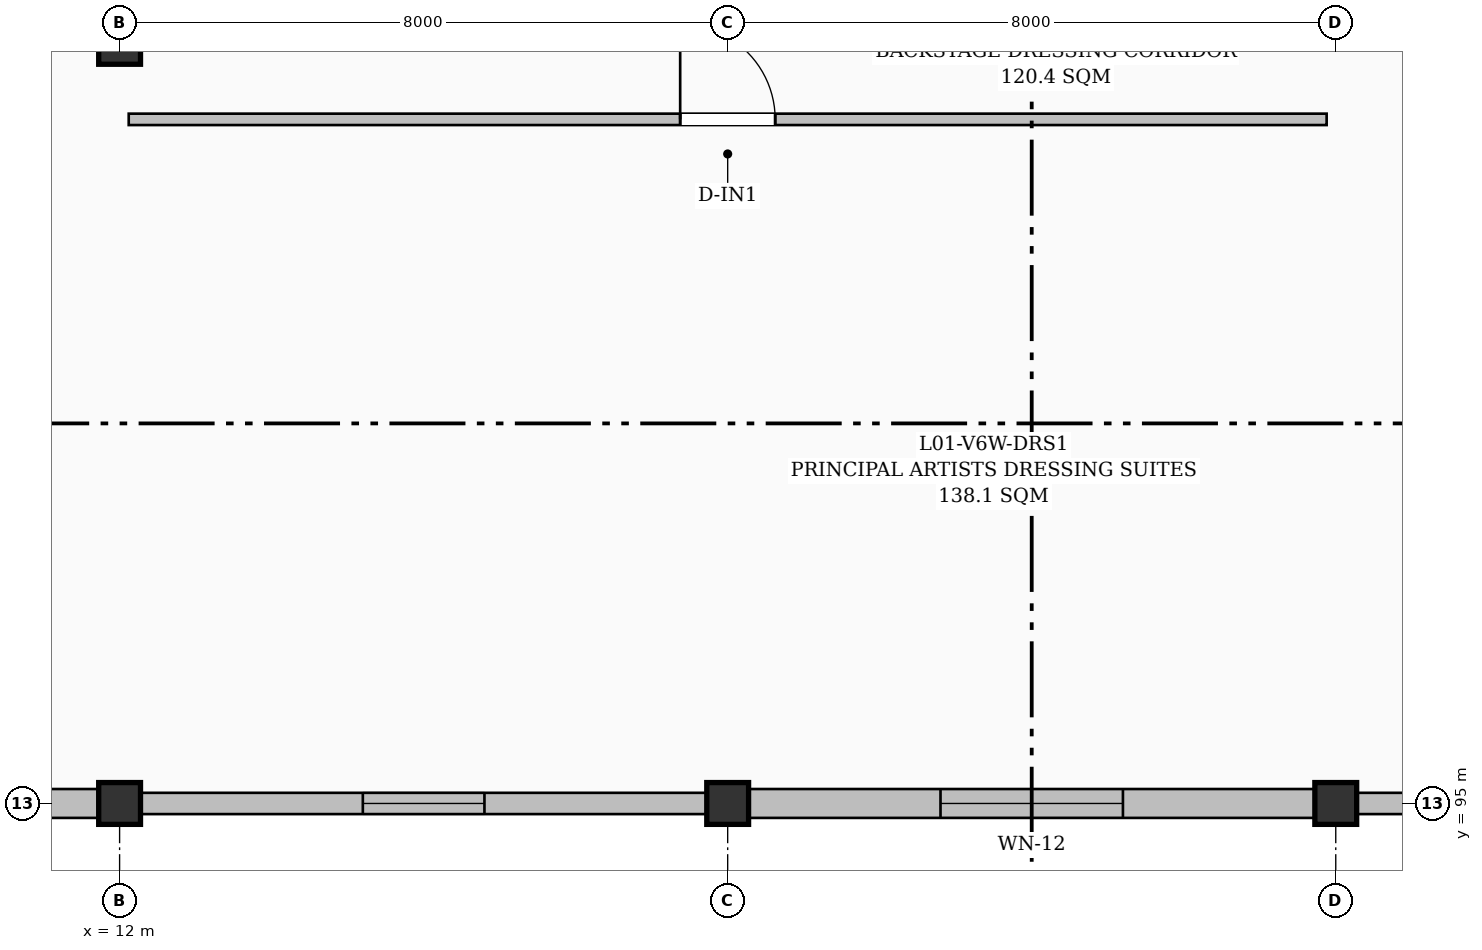
"""IFC4 building model, lengths in metres.
Left out: names, types, materials, properties, quantities, classifications, styles, units other than length and angle.
Written with IfcOpenShell. Run it as: python <this file> out.ifc"""

import sys

from ifc_helpers import new_model, si_unit, direction, frame, frame_2d, origin, origin_2d, place, context, subcontext, project, spatial, rectangle, extrude, element, fill, save


model = new_model("IFC4")
c1 = context("Model", 3, precision=1e-05, world=origin(), true_north=direction((0.0, 1.0)))
c2 = subcontext(c1, "Body", "Model", "MODEL_VIEW")
j1 = project(units=[si_unit("LENGTHUNIT", "METRE"), si_unit("PLANEANGLEUNIT", "RADIAN")], contexts=[c1])
p1 = place(None, origin())
s1 = spatial("IfcSite", under=j1, at=p1, CompositionType="ELEMENT")
p2 = place(p1, origin())
s2 = spatial("IfcBuilding", under=s1, at=p2, CompositionType="ELEMENT")
p3 = place(p2, frame((0.0, 0.0, 4.8)))
s3 = spatial("IfcBuildingStorey", under=s2, at=p3, CompositionType="ELEMENT", Elevation=4.8)
for number, where, z_axis, x_axis in (
    (1, (12.0, 95.0, 0.0), (0.0, 0.0, 1.0), (1.0, 0.0, 0.0)),
    (2, (12.0, 105.0, 0.0), (0.0, 0.0, 1.0), (1.0, 0.0, 0.0)),
    (3, (20.0, 95.0, 0.0), (0.0, 0.0, 1.0), (1.0, 0.0, 0.0)),
    (4, (28.0, 95.0, 0.0), (0.0, 0.0, 1.0), (1.0, 0.0, 0.0)),
):
    element("IfcColumn", number, at=place(p3, frame(where, z_axis=z_axis, x_axis=x_axis)), inside=s3, PredefinedType="COLUMN", context=c2, shape_type="SweptSolid", body=[
        extrude(rectangle(XDim=0.55, YDim=0.55, at=origin_2d()), origin(), (0.0, 0.0, 1.0), 4.5),
    ])
p4 = place(p3, frame((31.775, 95.0, 0.0), z_axis=(0.0, 0.0, 1.0), x_axis=(-1.0, 0.0, 0.0)))
e5 = element("IfcWall", 5, at=p4, inside=s3, PredefinedType="SOLIDWALL", context=c2, shape_type="SweptSolid", body=[
    extrude(rectangle(XDim=3.5, YDim=0.28, at=frame_2d((1.75, 0.0))), origin(), (0.0, 0.0, 1.0), 4.125),
])
p5 = place(p4, frame((1.0, 0.0, 0.95)))
e6 = element("IfcOpeningElement", 6, at=p5, cuts=e5, PredefinedType="OPENING", context=c2, shape_type="SweptSolid", body=[
    extrude(rectangle(XDim=1.5, YDim=1.5, at=frame_2d((0.75, 0.75))), frame((0.0, 0.15, 0.0), z_axis=(0.0, -1.0, 0.0), x_axis=(1.0, 0.0, 0.0)), (0.0, 0.0, 1.0), 0.3),
])
p6 = place(p3, frame((27.725, 95.0, 0.0), z_axis=(0.0, 0.0, 1.0), x_axis=(-1.0, 0.0, 0.0)))
e7 = element("IfcWall", 7, at=p6, inside=s3, PredefinedType="SOLIDWALL", context=c2, shape_type="SweptSolid", body=[
    extrude(rectangle(XDim=7.45, YDim=0.38, at=frame_2d((3.725, 0.0))), origin(), (0.0, 0.0, 1.0), 4.125),
])
p7 = place(p6, frame((2.525, 0.0, 0.95)))
e8 = element("IfcOpeningElement", 8, at=p7, cuts=e7, PredefinedType="OPENING", context=c2, shape_type="SweptSolid", body=[
    extrude(rectangle(XDim=2.4, YDim=1.5, at=frame_2d((1.2, 0.75))), frame((0.0, 0.2, 0.0), z_axis=(0.0, -1.0, 0.0), x_axis=(1.0, 0.0, 0.0)), (0.0, 0.0, 1.0), 0.4),
])
p8 = place(p3, frame((19.725, 95.0, 0.0), z_axis=(0.0, 0.0, 1.0), x_axis=(-1.0, 0.0, 0.0)))
e9 = element("IfcWall", 9, at=p8, inside=s3, PredefinedType="SOLIDWALL", context=c2, shape_type="SweptSolid", body=[
    extrude(rectangle(XDim=7.45, YDim=0.28, at=frame_2d((3.725, 0.0))), origin(), (0.0, 0.0, 1.0), 4.125),
])
p9 = place(p8, frame((2.925, 0.0, 0.95)))
e10 = element("IfcOpeningElement", 10, at=p9, cuts=e9, PredefinedType="OPENING", context=c2, shape_type="SweptSolid", body=[
    extrude(rectangle(XDim=1.6, YDim=1.2, at=frame_2d((0.8, 0.6))), frame((0.0, 0.15, 0.0), z_axis=(0.0, -1.0, 0.0), x_axis=(1.0, 0.0, 0.0)), (0.0, 0.0, 1.0), 0.3),
])
p10 = place(p3, frame((11.725, 95.0, 0.0), z_axis=(0.0, 0.0, 1.0), x_axis=(-1.0, 0.0, 0.0)))
e11 = element("IfcWall", 11, at=p10, inside=s3, PredefinedType="SOLIDWALL", context=c2, shape_type="SweptSolid", body=[
    extrude(rectangle(XDim=3.5, YDim=0.38, at=frame_2d((1.75, 0.0))), origin(), (0.0, 0.0, 1.0), 4.125),
])
p11 = place(p10, frame((1.3, 0.0, 0.95)))
e12 = element("IfcOpeningElement", 12, at=p11, cuts=e11, PredefinedType="OPENING", context=c2, shape_type="SweptSolid", body=[
    extrude(rectangle(XDim=0.9, YDim=1.8, at=frame_2d((0.45, 0.9))), frame((0.0, 0.2, 0.0), z_axis=(0.0, -1.0, 0.0), x_axis=(1.0, 0.0, 0.0)), (0.0, 0.0, 1.0), 0.4),
])
p12 = place(p3, frame((12.12, 104.0, 0.0), z_axis=(0.0, 0.0, 1.0), x_axis=(1.0, 0.0, 0.0)))
e13 = element("IfcWall", 13, at=p12, inside=s3, PredefinedType="PARTITIONING", context=c2, shape_type="SweptSolid", body=[
    extrude(rectangle(XDim=15.76, YDim=0.15, at=frame_2d((7.88, 0.0))), origin(), (0.0, 0.0, 1.0), 4.25),
])
p13 = place(p12, frame((7.255, 0.0, 0.0)))
e14 = element("IfcOpeningElement", 14, at=p13, cuts=e13, PredefinedType="OPENING", context=c2, shape_type="SweptSolid", body=[
    extrude(rectangle(XDim=1.25, YDim=2.15, at=frame_2d((0.625, 1.075))), frame((0.0, 0.085, 0.0), z_axis=(0.0, -1.0, 0.0), x_axis=(1.0, 0.0, 0.0)), (0.0, 0.0, 1.0), 0.17),
])
p14 = place(p7, origin())
e15 = element("IfcWindow", 15, at=p14, inside=s3, PartitioningType="TRIPLE_PANEL_VERTICAL", PredefinedType="WINDOW", context=c2, shape_type="SweptSolid", body=[
    extrude(rectangle(XDim=2.4, YDim=1.5, at=frame_2d((1.2, 0.75))), frame((0.0, 0.03, 0.0), z_axis=(0.0, -1.0, 0.0), x_axis=(1.0, 0.0, 0.0)), (0.0, 0.0, 1.0), 0.06),
])
fill(e8, e15)
p15 = place(p9, origin())
e16 = element("IfcWindow", 16, at=p15, inside=s3, PartitioningType="DOUBLE_PANEL_HORIZONTAL", PredefinedType="WINDOW", context=c2, shape_type="SweptSolid", body=[
    extrude(rectangle(XDim=1.6, YDim=1.2, at=frame_2d((0.8, 0.6))), frame((0.0, 0.03, 0.0), z_axis=(0.0, -1.0, 0.0), x_axis=(1.0, 0.0, 0.0)), (0.0, 0.0, 1.0), 0.06),
])
fill(e10, e16)
p16 = place(p13, origin())
e17 = element("IfcDoor", 17, at=p16, inside=s3, OperationType="SINGLE_SWING_LEFT", PredefinedType="DOOR", context=c2, shape_type="SweptSolid", body=[
    extrude(rectangle(XDim=1.25, YDim=2.15, at=frame_2d((0.625, 1.075))), frame((0.0, 0.025, 0.0), z_axis=(0.0, -1.0, 0.0), x_axis=(1.0, 0.0, 0.0)), (0.0, 0.0, 1.0), 0.05),
])
fill(e14, e17)
save(model, sys.argv[1])
